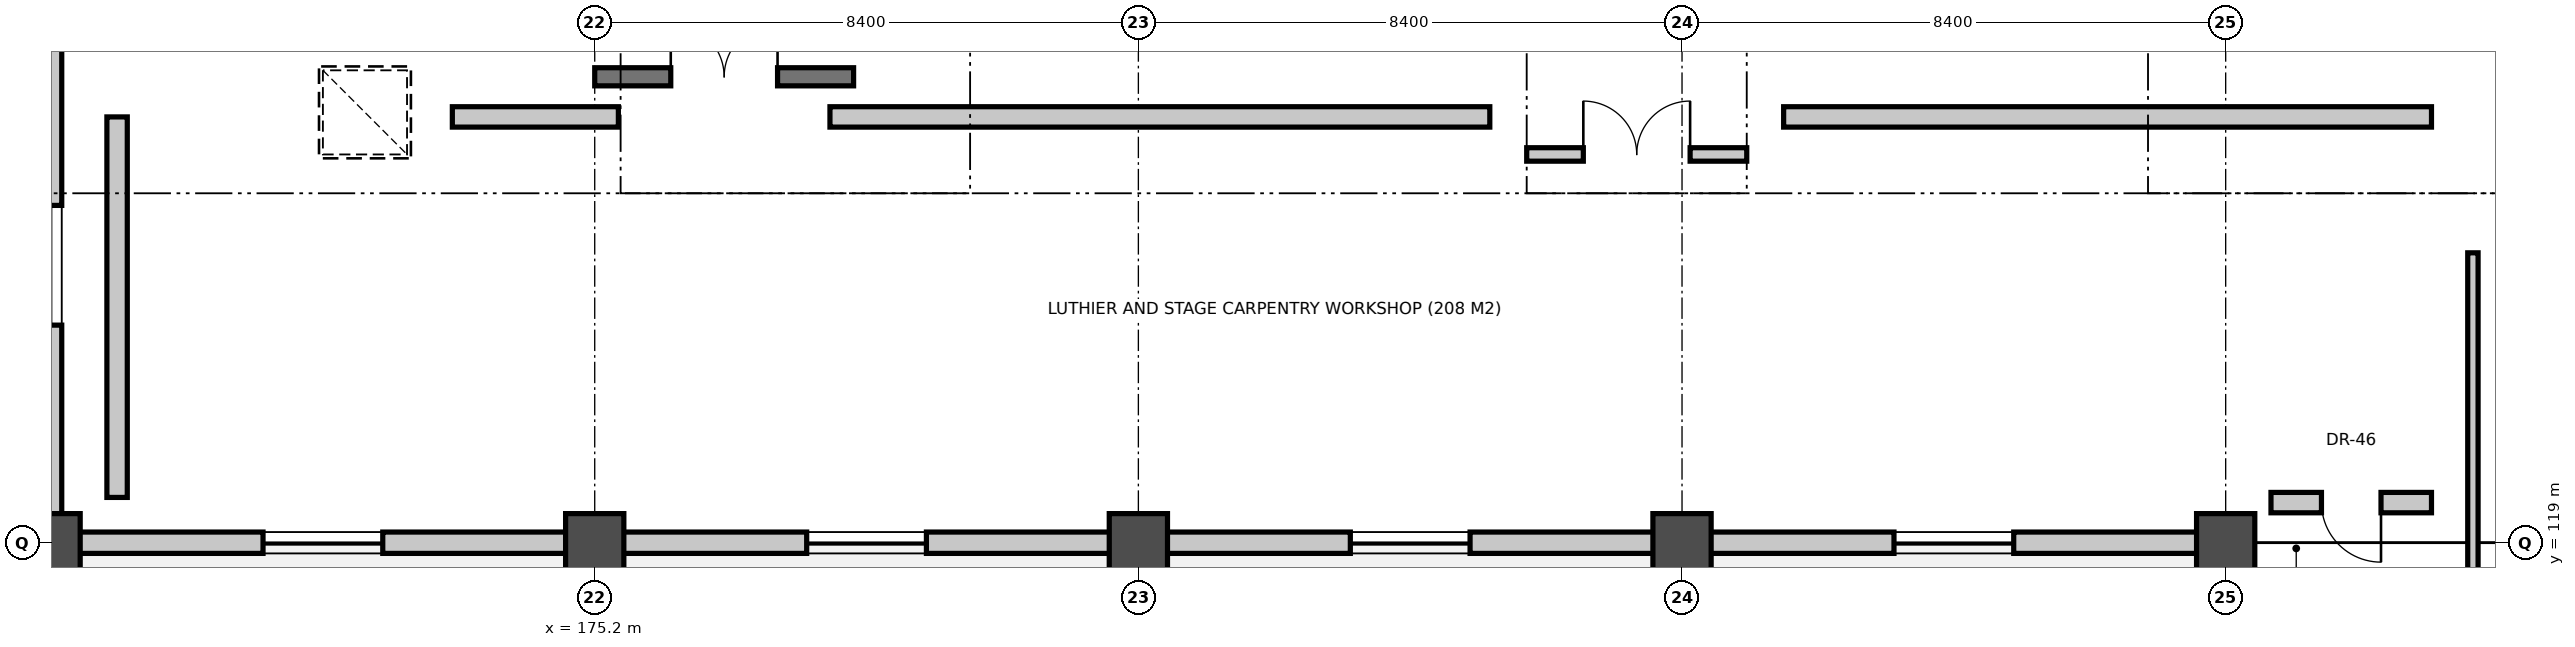
"""IFC4 building model, lengths in metres.
Left out: names, types, materials, properties, quantities, classifications, styles, units other than length and angle.
Written with IfcOpenShell. Run it as: python <this file> out.ifc"""

import sys

from ifc_helpers import new_model, si_unit, direction, frame, frame_2d, origin, origin_2d, place, context, subcontext, project, spatial, rectangle, circle, extrude, element, fill, save


model = new_model("IFC4")
c1 = context("Model", 3, precision=1e-05, world=origin(), true_north=direction((0.0, 1.0)))
c2 = subcontext(c1, "Body", "Model", "MODEL_VIEW")
j1 = project(units=[si_unit("LENGTHUNIT", "METRE"), si_unit("PLANEANGLEUNIT", "RADIAN")], contexts=[c1])
p1 = place(None, origin())
s1 = spatial("IfcSite", under=j1, at=p1, CompositionType="ELEMENT")
p2 = place(p1, origin())
s2 = spatial("IfcBuilding", under=s1, at=p2, CompositionType="ELEMENT")
p3 = place(p2, origin())
s3 = spatial("IfcBuildingStorey", under=s2, at=p3, CompositionType="ELEMENT", Elevation=0.0)
for number, where, z_axis, x_axis in (
    (1, (166.8, 119.0, 0.0), (0.0, 0.0, 1.0), (1.0, 0.0, 0.0)),
    (2, (175.2, 119.0, 0.0), (0.0, 0.0, 1.0), (1.0, 0.0, 0.0)),
    (3, (183.6, 119.0, 0.0), (0.0, 0.0, 1.0), (1.0, 0.0, 0.0)),
    (4, (192.0, 119.0, 0.0), (0.0, 0.0, 1.0), (1.0, 0.0, 0.0)),
    (5, (200.4, 119.0, 0.0), (0.0, 0.0, 1.0), (1.0, 0.0, 0.0)),
):
    element("IfcColumn", number, at=place(p3, frame(where, z_axis=z_axis, x_axis=x_axis)), inside=s3, PredefinedType="COLUMN", context=c2, shape_type="SweptSolid", body=[
        extrude(circle(Radius=0.45, at=origin_2d()), origin(), (0.0, 0.0, 1.0), 5.4),
    ])
p4 = place(p3, frame((166.8, 119.43, 0.0), z_axis=(0.0, 0.0, 1.0), x_axis=(0.0, 1.0, 0.0)))
e6 = element("IfcWall", 6, at=p4, inside=s3, PredefinedType="SOLIDWALL", context=c2, shape_type="SweptSolid", body=[
    extrude(rectangle(XDim=7.715, YDim=0.33, at=frame_2d((3.857, 0.0))), origin(), (0.0, 0.0, 1.0), 4.496),
])
p5 = place(p4, frame((2.933, 0.0, 1.0)))
e7 = element("IfcOpeningElement", 7, at=p5, cuts=e6, PredefinedType="OPENING", context=c2, shape_type="SweptSolid", body=[
    extrude(rectangle(XDim=1.85, YDim=2.1, at=frame_2d((0.925, 1.05))), frame((0.0, 0.175, 0.0), z_axis=(0.0, -1.0, 0.0), x_axis=(1.0, 0.0, 0.0)), (0.0, 0.0, 1.0), 0.35),
])
p6 = place(p3, frame((174.77, 119.0, 0.0), z_axis=(0.0, 0.0, 1.0), x_axis=(-1.0, 0.0, 0.0)))
e8 = element("IfcWall", 8, at=p6, inside=s3, PredefinedType="SOLIDWALL", context=c2, shape_type="SweptSolid", body=[
    extrude(rectangle(XDim=7.54, YDim=0.33, at=frame_2d((3.77, 0.0))), origin(), (0.0, 0.0, 1.0), 4.177),
])
p7 = place(p6, frame((2.845, 0.0, 1.0)))
e9 = element("IfcOpeningElement", 9, at=p7, cuts=e8, PredefinedType="OPENING", context=c2, shape_type="SweptSolid", body=[
    extrude(rectangle(XDim=1.85, YDim=2.1, at=frame_2d((0.925, 1.05))), frame((0.0, 0.175, 0.0), z_axis=(0.0, -1.0, 0.0), x_axis=(1.0, 0.0, 0.0)), (0.0, 0.0, 1.0), 0.35),
])
p8 = place(p3, frame((183.17, 119.0, 0.0), z_axis=(0.0, 0.0, 1.0), x_axis=(-1.0, 0.0, 0.0)))
e10 = element("IfcWall", 10, at=p8, inside=s3, PredefinedType="SOLIDWALL", context=c2, shape_type="SweptSolid", body=[
    extrude(rectangle(XDim=7.54, YDim=0.33, at=frame_2d((3.77, 0.0))), origin(), (0.0, 0.0, 1.0), 4.078),
])
p9 = place(p8, frame((2.845, 0.0, 1.0)))
e11 = element("IfcOpeningElement", 11, at=p9, cuts=e10, PredefinedType="OPENING", context=c2, shape_type="SweptSolid", body=[
    extrude(rectangle(XDim=1.85, YDim=2.1, at=frame_2d((0.925, 1.05))), frame((0.0, 0.175, 0.0), z_axis=(0.0, -1.0, 0.0), x_axis=(1.0, 0.0, 0.0)), (0.0, 0.0, 1.0), 0.35),
])
p10 = place(p3, frame((191.57, 119.0, 0.0), z_axis=(0.0, 0.0, 1.0), x_axis=(-1.0, 0.0, 0.0)))
e12 = element("IfcWall", 12, at=p10, inside=s3, PredefinedType="SOLIDWALL", context=c2, shape_type="SweptSolid", body=[
    extrude(rectangle(XDim=7.54, YDim=0.33, at=frame_2d((3.77, 0.0))), origin(), (0.0, 0.0, 1.0), 4.144),
])
p11 = place(p10, frame((2.845, 0.0, 1.0)))
e13 = element("IfcOpeningElement", 13, at=p11, cuts=e12, PredefinedType="OPENING", context=c2, shape_type="SweptSolid", body=[
    extrude(rectangle(XDim=1.85, YDim=2.1, at=frame_2d((0.925, 1.05))), frame((0.0, 0.175, 0.0), z_axis=(0.0, -1.0, 0.0), x_axis=(1.0, 0.0, 0.0)), (0.0, 0.0, 1.0), 0.35),
])
p12 = place(p3, frame((199.97, 119.0, 0.0), z_axis=(0.0, 0.0, 1.0), x_axis=(-1.0, 0.0, 0.0)))
e14 = element("IfcWall", 14, at=p12, inside=s3, PredefinedType="SOLIDWALL", context=c2, shape_type="SweptSolid", body=[
    extrude(rectangle(XDim=7.54, YDim=0.33, at=frame_2d((3.77, 0.0))), origin(), (0.0, 0.0, 1.0), 4.496),
])
p13 = place(p12, frame((2.845, 0.0, 1.0)))
e15 = element("IfcOpeningElement", 15, at=p13, cuts=e14, PredefinedType="OPENING", context=c2, shape_type="SweptSolid", body=[
    extrude(rectangle(XDim=1.85, YDim=2.1, at=frame_2d((0.925, 1.05))), frame((0.0, 0.175, 0.0), z_axis=(0.0, -1.0, 0.0), x_axis=(1.0, 0.0, 0.0)), (0.0, 0.0, 1.0), 0.35),
])
p14 = place(p3, frame((175.2, 126.2, 0.0), z_axis=(0.0, 0.0, 1.0), x_axis=(1.0, 0.0, 0.0)))
e16 = element("IfcWall", 16, at=p14, inside=s3, PredefinedType="SHEAR", context=c2, shape_type="SweptSolid", body=[
    extrude(rectangle(XDim=4.0, YDim=0.28, at=frame_2d((2.0, 0.0))), origin(), (0.0, 0.0, 1.0), 4.555),
])
p15 = place(p14, frame((1.175, 0.0, 0.0)))
e17 = element("IfcOpeningElement", 17, at=p15, cuts=e16, PredefinedType="OPENING", context=c2, shape_type="SweptSolid", body=[
    extrude(rectangle(XDim=1.65, YDim=2.2, at=frame_2d((0.825, 1.1))), frame((0.0, 0.15, 0.0), z_axis=(0.0, -1.0, 0.0), x_axis=(1.0, 0.0, 0.0)), (0.0, 0.0, 1.0), 0.3),
])
p16 = place(p3, frame((189.6, 125.0, 0.0), z_axis=(0.0, 0.0, 1.0), x_axis=(1.0, 0.0, 0.0)))
e18 = element("IfcWall", 18, at=p16, inside=s3, PredefinedType="PARTITIONING", context=c2, shape_type="SweptSolid", body=[
    extrude(rectangle(XDim=3.4, YDim=0.208, at=frame_2d((1.7, 0.0))), origin(), (0.0, 0.0, 1.0), 4.334),
])
p17 = place(p16, frame((0.875, 0.0, 0.0)))
e19 = element("IfcOpeningElement", 19, at=p17, cuts=e18, PredefinedType="OPENING", context=c2, shape_type="SweptSolid", body=[
    extrude(rectangle(XDim=1.65, YDim=2.2, at=frame_2d((0.825, 1.1))), frame((0.0, 0.114, 0.0), z_axis=(0.0, -1.0, 0.0), x_axis=(1.0, 0.0, 0.0)), (0.0, 0.0, 1.0), 0.228),
])
p18 = place(p3, frame((203.58, 119.62, 0.0), z_axis=(0.0, 0.0, 1.0), x_axis=(-1.0, 0.0, 0.0)))
e20 = element("IfcWall", 20, at=p18, inside=s3, PredefinedType="PARTITIONING", context=c2, shape_type="SweptSolid", body=[
    extrude(rectangle(XDim=2.48, YDim=0.315, at=frame_2d((1.24, 0.0))), origin(), (0.0, 0.0, 1.0), 4.04),
])
p19 = place(p18, frame((0.78, 0.0, 0.0)))
e21 = element("IfcOpeningElement", 21, at=p19, cuts=e20, PredefinedType="OPENING", context=c2, shape_type="SweptSolid", body=[
    extrude(rectangle(XDim=0.92, YDim=2.12, at=frame_2d((0.46, 1.06))), frame((0.0, 0.167, 0.0), z_axis=(0.0, -1.0, 0.0), x_axis=(1.0, 0.0, 0.0)), (0.0, 0.0, 1.0), 0.335),
])
p20 = place(p3, frame((173.0, 125.58, 0.0), z_axis=(0.0, 0.0, 1.0), x_axis=(1.0, 0.0, 0.0)))
e22 = element("IfcWall", 22, at=p20, inside=s3, PredefinedType="PARTITIONING", context=c2, shape_type="SweptSolid", body=[
    extrude(rectangle(XDim=2.565, YDim=0.315, at=frame_2d((1.283, 0.0))), origin(), (0.0, 0.0, 1.0), 4.04),
])
p21 = place(p3, frame((178.835, 125.58, 0.0), z_axis=(0.0, 0.0, 1.0), x_axis=(1.0, 0.0, 0.0)))
e23 = element("IfcWall", 23, at=p21, inside=s3, PredefinedType="PARTITIONING", context=c2, shape_type="SweptSolid", body=[
    extrude(rectangle(XDim=10.195, YDim=0.315, at=frame_2d((5.098, 0.0))), origin(), (0.0, 0.0, 1.0), 4.04),
])
p22 = place(p3, frame((193.57, 125.58, 0.0), z_axis=(0.0, 0.0, 1.0), x_axis=(1.0, 0.0, 0.0)))
e24 = element("IfcWall", 24, at=p22, inside=s3, PredefinedType="PARTITIONING", context=c2, shape_type="SweptSolid", body=[
    extrude(rectangle(XDim=10.01, YDim=0.315, at=frame_2d((5.005, 0.0))), origin(), (0.0, 0.0, 1.0), 4.04),
])
p23 = place(p3, frame((167.82, 119.7, 0.0), z_axis=(0.0, 0.0, 1.0), x_axis=(0.0, 1.0, 0.0)))
e25 = element("IfcWall", 25, at=p23, inside=s3, PredefinedType="PARTITIONING", context=c2, shape_type="SweptSolid", body=[
    extrude(rectangle(XDim=5.88, YDim=0.315, at=frame_2d((2.94, 0.0))), origin(), (0.0, 0.0, 1.0), 4.04),
])
p24 = place(p3, frame((204.22, 112.02, 0.0), z_axis=(0.0, 0.0, 1.0), x_axis=(0.0, 1.0, 0.0)))
e26 = element("IfcWall", 26, at=p24, inside=s3, PredefinedType="PARTITIONING", context=c2, shape_type="SweptSolid", body=[
    extrude(rectangle(XDim=11.46, YDim=0.16, at=frame_2d((5.73, 0.0))), origin(), (0.0, 0.0, 1.0), 4.04),
])
p25 = place(p24, frame((5.27, 0.0, 0.0)))
e27 = element("IfcOpeningElement", 27, at=p25, cuts=e26, PredefinedType="OPENING", context=c2, shape_type="SweptSolid", body=[
    extrude(rectangle(XDim=0.92, YDim=2.12, at=frame_2d((0.46, 1.06))), frame((0.0, 0.09, 0.0), z_axis=(0.0, -1.0, 0.0), x_axis=(1.0, 0.0, 0.0)), (0.0, 0.0, 1.0), 0.18),
])
p26 = place(p5, origin())
e28 = element("IfcWindow", 28, at=p26, inside=s3, PartitioningType="SINGLE_PANEL", PredefinedType="WINDOW", context=c2, shape_type="SweptSolid", body=[
    extrude(rectangle(XDim=1.85, YDim=2.1, at=frame_2d((0.925, 1.05))), frame((0.0, 0.03, 0.0), z_axis=(0.0, -1.0, 0.0), x_axis=(1.0, 0.0, 0.0)), (0.0, 0.0, 1.0), 0.06),
])
fill(e7, e28)
p27 = place(p7, origin())
e29 = element("IfcWindow", 29, at=p27, inside=s3, PartitioningType="SINGLE_PANEL", PredefinedType="WINDOW", context=c2, shape_type="SweptSolid", body=[
    extrude(rectangle(XDim=1.85, YDim=2.1, at=frame_2d((0.925, 1.05))), frame((0.0, 0.03, 0.0), z_axis=(0.0, -1.0, 0.0), x_axis=(1.0, 0.0, 0.0)), (0.0, 0.0, 1.0), 0.06),
])
fill(e9, e29)
p28 = place(p9, origin())
e30 = element("IfcWindow", 30, at=p28, inside=s3, PartitioningType="SINGLE_PANEL", PredefinedType="WINDOW", context=c2, shape_type="SweptSolid", body=[
    extrude(rectangle(XDim=1.85, YDim=2.1, at=frame_2d((0.925, 1.05))), frame((0.0, 0.03, 0.0), z_axis=(0.0, -1.0, 0.0), x_axis=(1.0, 0.0, 0.0)), (0.0, 0.0, 1.0), 0.06),
])
fill(e11, e30)
p29 = place(p11, origin())
e31 = element("IfcWindow", 31, at=p29, inside=s3, PartitioningType="SINGLE_PANEL", PredefinedType="WINDOW", context=c2, shape_type="SweptSolid", body=[
    extrude(rectangle(XDim=1.85, YDim=2.1, at=frame_2d((0.925, 1.05))), frame((0.0, 0.03, 0.0), z_axis=(0.0, -1.0, 0.0), x_axis=(1.0, 0.0, 0.0)), (0.0, 0.0, 1.0), 0.06),
])
fill(e13, e31)
p30 = place(p13, origin())
e32 = element("IfcWindow", 32, at=p30, inside=s3, PartitioningType="SINGLE_PANEL", PredefinedType="WINDOW", context=c2, shape_type="SweptSolid", body=[
    extrude(rectangle(XDim=1.85, YDim=2.1, at=frame_2d((0.925, 1.05))), frame((0.0, 0.03, 0.0), z_axis=(0.0, -1.0, 0.0), x_axis=(1.0, 0.0, 0.0)), (0.0, 0.0, 1.0), 0.06),
])
fill(e15, e32)
p31 = place(p15, origin())
e33 = element("IfcDoor", 33, at=p31, inside=s3, OperationType="DOUBLE_DOOR_SINGLE_SWING", PredefinedType="DOOR", context=c2, shape_type="SweptSolid", body=[
    extrude(rectangle(XDim=1.65, YDim=2.2, at=frame_2d((0.825, 1.1))), frame((0.0, 0.025, 0.0), z_axis=(0.0, -1.0, 0.0), x_axis=(1.0, 0.0, 0.0)), (0.0, 0.0, 1.0), 0.05),
])
fill(e17, e33)
p32 = place(p17, origin())
e34 = element("IfcDoor", 34, at=p32, inside=s3, OperationType="DOUBLE_DOOR_SINGLE_SWING", PredefinedType="DOOR", context=c2, shape_type="SweptSolid", body=[
    extrude(rectangle(XDim=1.65, YDim=2.2, at=frame_2d((0.825, 1.1))), frame((0.0, 0.025, 0.0), z_axis=(0.0, -1.0, 0.0), x_axis=(1.0, 0.0, 0.0)), (0.0, 0.0, 1.0), 0.05),
])
fill(e19, e34)
p33 = place(p19, origin())
e35 = element("IfcDoor", 35, at=p33, inside=s3, OperationType="SINGLE_SWING_LEFT", PredefinedType="DOOR", context=c2, shape_type="SweptSolid", body=[
    extrude(rectangle(XDim=0.92, YDim=2.12, at=frame_2d((0.46, 1.06))), frame((0.0, 0.025, 0.0), z_axis=(0.0, -1.0, 0.0), x_axis=(1.0, 0.0, 0.0)), (0.0, 0.0, 1.0), 0.05),
])
fill(e21, e35)
save(model, sys.argv[1])
